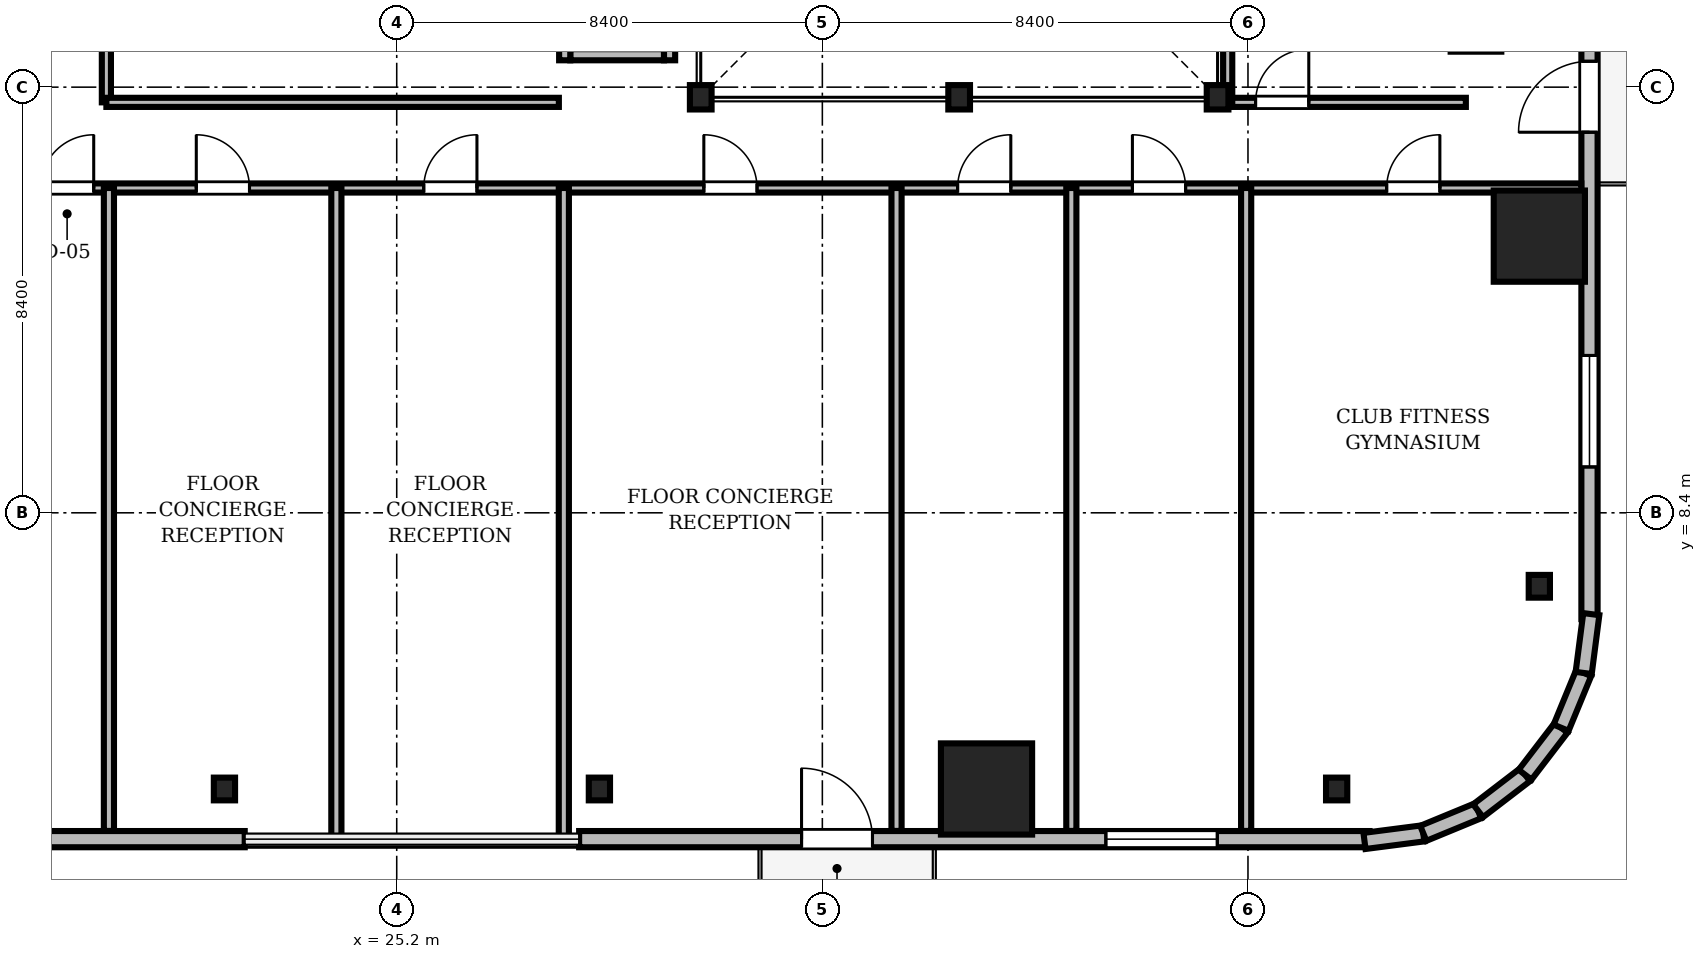
"""IFC4 building model, lengths in metres.
Left out: names, types, materials, properties, quantities, classifications, styles, units other than length and angle.
Written with IfcOpenShell. Run it as: python <this file> out.ifc"""

import sys

from ifc_helpers import new_model, si_unit, direction, frame, frame_2d, origin, origin_2d, place, context, subcontext, project, spatial, rectangle, i_section, extrude, source, transform, mapped, element, fill, save


model = new_model("IFC4")
c1 = context("Model", 3, precision=1e-05, world=origin(), true_north=direction((0.0, 1.0)))
c2 = subcontext(c1, "Body", "Model", "MODEL_VIEW")
j1 = project(units=[si_unit("LENGTHUNIT", "METRE"), si_unit("PLANEANGLEUNIT", "RADIAN")], contexts=[c1])
p1 = place(None, origin())
s1 = spatial("IfcSite", under=j1, at=p1, CompositionType="ELEMENT")
p2 = place(p1, origin())
s2 = spatial("IfcBuilding", under=s1, at=p2, CompositionType="ELEMENT")
p3 = place(p2, frame((0.0, 0.0, 82.35)))
s3 = spatial("IfcBuildingStorey", under=s2, at=p3, CompositionType="ELEMENT", Elevation=82.35)
m1 = source(origin(), c2, "Body", "SweptSolid", [
    extrude(i_section(OverallWidth=0.428, OverallDepth=0.481, WebThickness=0.04, FlangeThickness=0.063, FilletRadius=0.015, at=origin_2d()), origin(), (0.0, 0.0, 1.0), 3.41),
])
for number, where, z_axis, x_axis in (
    (1, (31.2, 16.6, 0.0), (0.0, 0.0, 1.0), (1.0, 0.0, 0.0)),
    (2, (36.3, 16.6, 0.0), (0.0, 0.0, 1.0), (1.0, 0.0, 0.0)),
    (3, (41.4, 16.6, 0.0), (0.0, 0.0, 1.0), (1.0, 0.0, 0.0)),
):
    element("IfcColumn", number, at=place(p3, frame(where, z_axis=z_axis, x_axis=x_axis)), inside=s3, PredefinedType="COLUMN", context=c2, shape_type="MappedRepresentation", body=[
        mapped(m1, transform((0.0, 0.0, 0.0), scale=1.0)),
    ])
m2 = source(origin(), c2, "Body", "SweptSolid", [
    extrude(rectangle(XDim=1.8, YDim=1.8, at=origin_2d()), origin(), (0.0, 0.0, 1.0), 3.41),
])
for number, where, z_axis, x_axis in (
    (4, (36.84, 2.95, 0.0), (0.0, 0.0, 1.0), (1.0, 0.0, 0.0)),
    (5, (47.75, 13.86, 0.0), (0.0, 0.0, 1.0), (1.0, 0.0, 0.0)),
):
    element("IfcColumn", number, at=place(p3, frame(where, z_axis=z_axis, x_axis=x_axis)), inside=s3, PredefinedType="COLUMN", context=c2, shape_type="MappedRepresentation", body=[
        mapped(m2, transform((0.0, 0.0, 0.0), scale=1.0)),
    ])
m3 = source(origin(), c2, "Body", "SweptSolid", [
    extrude(i_section(OverallWidth=0.419, OverallDepth=0.449, WebThickness=0.031, FlangeThickness=0.048, FilletRadius=0.015, at=origin_2d()), origin(), (0.0, 0.0, 1.0), 3.41),
])
for number, where, z_axis, x_axis in (
    (6, (21.8, 2.95, 0.0), (0.0, 0.0, 1.0), (1.0, 0.0, 0.0)),
    (7, (29.2, 2.95, 0.0), (0.0, 0.0, 1.0), (1.0, 0.0, 0.0)),
    (8, (43.75, 2.95, 0.0), (0.0, 0.0, 1.0), (1.0, 0.0, 0.0)),
    (9, (47.75, 6.95, 0.0), (0.0, 0.0, 1.0), (1.0, 0.0, 0.0)),
):
    element("IfcColumn", number, at=place(p3, frame(where, z_axis=z_axis, x_axis=x_axis)), inside=s3, PredefinedType="COLUMN", context=c2, shape_type="MappedRepresentation", body=[
        mapped(m3, transform((0.0, 0.0, 0.0), scale=1.0)),
    ])
m4 = source(origin(), c2, "Body", "SweptSolid", [
    extrude(rectangle(XDim=15.6, YDim=0.32, at=frame_2d((7.8, 0.0))), origin(), (0.0, 0.0, 1.0), 3.41),
])
p4 = place(p3, frame((6.6, 1.96, 0.0), z_axis=(0.0, 0.0, 1.0), x_axis=(1.0, 0.0, 0.0)))
e10 = element("IfcWall", 10, at=p4, inside=s3, PredefinedType="SOLIDWALL", context=c2, shape_type="MappedRepresentation", body=[
    mapped(m4, transform((0.0, 0.0, 0.0), scale=1.0)),
])
m5 = source(origin(), c2, "Body", "SweptSolid", [
    extrude(rectangle(XDim=2.2, YDim=2.4, at=frame_2d((1.1, 1.2))), frame((0.0, 0.17, 0.0), z_axis=(0.0, -1.0, 0.0), x_axis=(1.0, 0.0, 0.0)), (0.0, 0.0, 1.0), 0.34),
])
p5 = place(p4, frame((3.005, 0.0, 0.72)))
e11 = element("IfcOpeningElement", 11, at=p5, cuts=e10, PredefinedType="OPENING", context=c2, shape_type="MappedRepresentation", body=[
    mapped(m5, transform((0.0, 0.0, 0.0), scale=1.0)),
])
p6 = place(p3, frame((28.8, 1.96, 0.0), z_axis=(0.0, 0.0, 1.0), x_axis=(1.0, 0.0, 0.0)))
e12 = element("IfcWall", 12, at=p6, inside=s3, PredefinedType="SOLIDWALL", context=c2, shape_type="MappedRepresentation", body=[
    mapped(m4, transform((0.0, 0.0, 0.0), scale=1.0)),
])
m6 = source(origin(), c2, "Body", "SweptSolid", [
    extrude(rectangle(XDim=1.4, YDim=2.3, at=frame_2d((0.7, 1.15))), frame((0.0, 0.17, 0.0), z_axis=(0.0, -1.0, 0.0), x_axis=(1.0, 0.0, 0.0)), (0.0, 0.0, 1.0), 0.34),
])
p7 = place(p6, frame((4.39, 0.0, 0.0)))
e13 = element("IfcOpeningElement", 13, at=p7, cuts=e12, PredefinedType="OPENING", context=c2, shape_type="MappedRepresentation", body=[
    mapped(m6, transform((0.0, 0.0, 0.0), scale=1.0)),
])
p8 = place(p6, frame((10.395, 0.0, 0.72)))
e14 = element("IfcOpeningElement", 14, at=p8, cuts=e12, PredefinedType="OPENING", context=c2, shape_type="MappedRepresentation", body=[
    mapped(m5, transform((0.0, 0.0, 0.0), scale=1.0)),
])
p9 = place(p3, frame((48.74, 6.3, 0.0), z_axis=(0.0, 0.0, 1.0), x_axis=(0.0, 1.0, 0.0)))
e15 = element("IfcWall", 15, at=p9, inside=s3, PredefinedType="SOLIDWALL", context=c2, shape_type="MappedRepresentation", body=[
    mapped(m4, transform((0.0, 0.0, 0.0), scale=1.0)),
])
p10 = place(p9, frame((9.61, 0.0, 0.0)))
e16 = element("IfcOpeningElement", 16, at=p10, cuts=e15, PredefinedType="OPENING", context=c2, shape_type="MappedRepresentation", body=[
    mapped(m6, transform((0.0, 0.0, 0.0), scale=1.0)),
])
p11 = place(p9, frame((3.005, 0.0, 0.72)))
e17 = element("IfcOpeningElement", 17, at=p11, cuts=e15, PredefinedType="OPENING", context=c2, shape_type="MappedRepresentation", body=[
    mapped(m5, transform((0.0, 0.0, 0.0), scale=1.0)),
])
m7 = source(origin(), c2, "Body", "SweptSolid", [
    extrude(rectangle(XDim=1.17, YDim=0.32, at=frame_2d((0.585, 0.0))), origin(), (0.0, 0.0, 1.0), 3.41),
])
p12 = place(p3, frame((44.3, 1.925, 0.0), z_axis=(0.0, 0.0, 1.0), x_axis=(0.991762485493, 0.128090485085, 0.0)))
e18 = element("IfcWall", 18, at=p12, inside=s3, PredefinedType="SOLIDWALL", context=c2, shape_type="MappedRepresentation", body=[
    mapped(m7, transform((0.0, 0.0, 0.0), scale=1.0)),
])
m8 = source(origin(), c2, "Body", "SweptSolid", [
    extrude(rectangle(XDim=1.169, YDim=0.32, at=frame_2d((0.585, 0.0))), origin(), (0.0, 0.0, 1.0), 3.41),
])
p13 = place(p3, frame((45.46, 2.074, 0.0), z_axis=(0.0, 0.0, 1.0), x_axis=(0.924479075121, 0.381232789334, 0.0)))
e19 = element("IfcWall", 19, at=p13, inside=s3, PredefinedType="SOLIDWALL", context=c2, shape_type="MappedRepresentation", body=[
    mapped(m8, transform((0.0, 0.0, 0.0), scale=1.0)),
])
m9 = source(origin(), c2, "Body", "SweptSolid", [
    extrude(rectangle(XDim=1.169, YDim=0.32, at=frame_2d((0.584, 0.0))), origin(), (0.0, 0.0, 1.0), 3.41),
])
p14 = place(p3, frame((46.541, 2.52, 0.0), z_axis=(0.0, 0.0, 1.0), x_axis=(0.793663520347, 0.608356981114, 0.0)))
e20 = element("IfcWall", 20, at=p14, inside=s3, PredefinedType="SOLIDWALL", context=c2, shape_type="MappedRepresentation", body=[
    mapped(m9, transform((0.0, 0.0, 0.0), scale=1.0)),
])
m10 = source(origin(), c2, "Body", "SweptSolid", [
    extrude(rectangle(XDim=1.169, YDim=0.32, at=frame_2d((0.584, 0.0))), origin(), (0.0, 0.0, 1.0), 3.41),
])
for number, where, z_axis, x_axis in (
    (21, (47.469, 3.231, 0.0), (0.0, 0.0, 1.0), (0.608, 0.794, 0.0)),
    (22, (48.18, 4.159, 0.0), (0.0, 0.0, 1.0), (0.381, 0.925, 0.0)),
):
    element("IfcWall", number, at=place(p3, frame(where, z_axis=z_axis, x_axis=x_axis)), inside=s3, PredefinedType="SOLIDWALL", context=c2, shape_type="MappedRepresentation", body=[
        mapped(m10, transform((0.0, 0.0, 0.0), scale=1.0)),
    ])
m11 = source(origin(), c2, "Body", "SweptSolid", [
    extrude(rectangle(XDim=1.171, YDim=0.32, at=frame_2d((0.585, 0.0))), origin(), (0.0, 0.0, 1.0), 3.41),
])
p15 = place(p3, frame((48.625, 5.24, 0.0), z_axis=(0.0, 0.0, 1.0), x_axis=(0.128269133229, 0.991739395941, 0.0)))
e23 = element("IfcWall", 23, at=p15, inside=s3, PredefinedType="SOLIDWALL", context=c2, shape_type="MappedRepresentation", body=[
    mapped(m11, transform((0.0, 0.0, 0.0), scale=1.0)),
])
m12 = source(origin(), c2, "Body", "SweptSolid", [
    extrude(rectangle(XDim=1.85, YDim=0.22, at=frame_2d((0.925, 0.0))), origin(), (0.0, 0.0, 1.0), 3.41),
])
p16 = place(p3, frame((28.625, 17.44, 0.0), z_axis=(0.0, 0.0, 1.0), x_axis=(1.0, 0.0, 0.0)))
e24 = element("IfcWall", 24, at=p16, inside=s3, PredefinedType="SOLIDWALL", context=c2, shape_type="MappedRepresentation", body=[
    mapped(m12, transform((0.0, 0.0, 0.0), scale=1.0)),
])
m13 = source(origin(), c2, "Body", "SweptSolid", [
    extrude(rectangle(XDim=2.54, YDim=0.22, at=frame_2d((1.27, 0.0))), origin(), (0.0, 0.0, 1.0), 3.41),
])
for number, where, z_axis, x_axis in (
    (25, (28.515, 17.33, 0.0), (0.0, 0.0, 1.0), (0.0, 1.0, 0.0)),
    (26, (30.585, 17.33, 0.0), (0.0, 0.0, 1.0), (0.0, 1.0, 0.0)),
):
    element("IfcWall", number, at=place(p3, frame(where, z_axis=z_axis, x_axis=x_axis)), inside=s3, PredefinedType="SOLIDWALL", context=c2, shape_type="MappedRepresentation", body=[
        mapped(m13, transform((0.0, 0.0, 0.0), scale=1.0)),
    ])
m14 = source(origin(), c2, "Body", "SweptSolid", [
    extrude(rectangle(XDim=46.156, YDim=0.18, at=frame_2d((23.078, 0.0))), origin(), (0.0, 0.0, 1.0), 2.652),
])
p17 = place(p3, frame((2.422, 14.81, 0.0), z_axis=(0.0, 0.0, 1.0), x_axis=(1.0, 0.0, 0.0)))
e27 = element("IfcWall", 27, at=p17, inside=s3, PredefinedType="PARTITIONING", context=c2, shape_type="MappedRepresentation", body=[
    mapped(m14, transform((0.0, 0.0, 0.0), scale=1.0)),
])
m15 = source(origin(), c2, "Body", "SweptSolid", [
    extrude(rectangle(XDim=1.05, YDim=2.2, at=frame_2d((0.525, 1.1))), frame((0.0, 0.1, 0.0), z_axis=(0.0, -1.0, 0.0), x_axis=(1.0, 0.0, 0.0)), (0.0, 0.0, 1.0), 0.2),
])
p18 = place(p17, frame((15.748, 0.0, 0.0)))
e28 = element("IfcOpeningElement", 28, at=p18, cuts=e27, PredefinedType="OPENING", context=c2, shape_type="MappedRepresentation", body=[
    mapped(m15, transform((0.0, 0.0, 0.0), scale=1.0)),
])
p19 = place(p17, frame((18.823, 0.0, 0.0)))
e29 = element("IfcOpeningElement", 29, at=p19, cuts=e27, PredefinedType="OPENING", context=c2, shape_type="MappedRepresentation", body=[
    mapped(m15, transform((0.0, 0.0, 0.0), scale=1.0)),
])
p20 = place(p17, frame((23.311, 0.0, 0.0)))
e30 = element("IfcOpeningElement", 30, at=p20, cuts=e27, PredefinedType="OPENING", context=c2, shape_type="MappedRepresentation", body=[
    mapped(m15, transform((0.0, 0.0, 0.0), scale=1.0)),
])
p21 = place(p17, frame((28.839, 0.0, 0.0)))
e31 = element("IfcOpeningElement", 31, at=p21, cuts=e27, PredefinedType="OPENING", context=c2, shape_type="MappedRepresentation", body=[
    mapped(m15, transform((0.0, 0.0, 0.0), scale=1.0)),
])
p22 = place(p17, frame((33.847, 0.0, 0.0)))
e32 = element("IfcOpeningElement", 32, at=p22, cuts=e27, PredefinedType="OPENING", context=c2, shape_type="MappedRepresentation", body=[
    mapped(m15, transform((0.0, 0.0, 0.0), scale=1.0)),
])
p23 = place(p17, frame((37.297, 0.0, 0.0)))
e33 = element("IfcOpeningElement", 33, at=p23, cuts=e27, PredefinedType="OPENING", context=c2, shape_type="MappedRepresentation", body=[
    mapped(m15, transform((0.0, 0.0, 0.0), scale=1.0)),
])
p24 = place(p17, frame((42.315, 0.0, 0.0)))
e34 = element("IfcOpeningElement", 34, at=p24, cuts=e27, PredefinedType="OPENING", context=c2, shape_type="MappedRepresentation", body=[
    mapped(m15, transform((0.0, 0.0, 0.0), scale=1.0)),
])
m16 = source(origin(), c2, "Body", "SweptSolid", [
    extrude(rectangle(XDim=11.94, YDim=0.18, at=frame_2d((5.97, 0.0))), origin(), (0.0, 0.0, 1.0), 2.802),
])
p25 = place(p3, frame((19.47, 16.5, 0.0), z_axis=(0.0, 0.0, 1.0), x_axis=(0.0, 1.0, 0.0)))
e35 = element("IfcWall", 35, at=p25, inside=s3, PredefinedType="PARTITIONING", context=c2, shape_type="MappedRepresentation", body=[
    mapped(m16, transform((0.0, 0.0, 0.0), scale=1.0)),
])
p26 = place(p25, frame((4.5, 0.0, 0.0)))
e36 = element("IfcOpeningElement", 36, at=p26, cuts=e35, PredefinedType="OPENING", context=c2, shape_type="MappedRepresentation", body=[
    mapped(m15, transform((0.0, 0.0, 0.0), scale=1.0)),
])
m17 = source(origin(), c2, "Body", "SweptSolid", [
    extrude(rectangle(XDim=4.7, YDim=0.18, at=frame_2d((2.35, 0.0))), origin(), (0.0, 0.0, 1.0), 2.802),
])
p27 = place(p3, frame((41.6, 16.5, 0.0), z_axis=(0.0, 0.0, 1.0), x_axis=(1.0, 0.0, 0.0)))
e37 = element("IfcWall", 37, at=p27, inside=s3, PredefinedType="PARTITIONING", context=c2, shape_type="MappedRepresentation", body=[
    mapped(m17, transform((0.0, 0.0, 0.0), scale=1.0)),
])
p28 = place(p27, frame((0.55, 0.0, 0.0)))
e38 = element("IfcOpeningElement", 38, at=p28, cuts=e37, PredefinedType="OPENING", context=c2, shape_type="MappedRepresentation", body=[
    mapped(m15, transform((0.0, 0.0, 0.0), scale=1.0)),
])
m18 = source(origin(), c2, "Body", "SweptSolid", [
    extrude(rectangle(XDim=12.688, YDim=0.2, at=frame_2d((6.344, 0.0))), origin(), (0.0, 0.0, 1.0), 2.652),
])
p29 = place(p3, frame((19.52, 2.122, 0.0), z_axis=(0.0, 0.0, 1.0), x_axis=(0.0, 1.0, 0.0)))
e39 = element("IfcWall", 39, at=p29, inside=s3, PredefinedType="PARTITIONING", context=c2, shape_type="MappedRepresentation", body=[
    mapped(m18, transform((0.0, 0.0, 0.0), scale=1.0)),
])
m19 = source(origin(), c2, "Body", "SweptSolid", [
    extrude(rectangle(XDim=12.88, YDim=0.2, at=frame_2d((6.44, 0.0))), origin(), (0.0, 0.0, 1.0), 2.652),
])
for number, where, z_axis, x_axis in (
    (40, (24.009, 1.93, 0.0), (0.0, 0.0, 1.0), (0.0, 1.0, 0.0)),
    (41, (28.498, 1.93, 0.0), (0.0, 0.0, 1.0), (0.0, 1.0, 0.0)),
):
    element("IfcWall", number, at=place(p3, frame(where, z_axis=z_axis, x_axis=x_axis)), inside=s3, PredefinedType="PARTITIONING", context=c2, shape_type="MappedRepresentation", body=[
        mapped(m19, transform((0.0, 0.0, 0.0), scale=1.0)),
    ])
for number, where, z_axis, x_axis in (
    (42, (35.064, 2.122, 0.0), (0.0, 0.0, 1.0), (0.0, 1.0, 0.0)),
    (43, (38.514, 2.122, 0.0), (0.0, 0.0, 1.0), (0.0, 1.0, 0.0)),
    (44, (41.964, 2.122, 0.0), (0.0, 0.0, 1.0), (0.0, 1.0, 0.0)),
):
    element("IfcWall", number, at=place(p3, frame(where, z_axis=z_axis, x_axis=x_axis)), inside=s3, PredefinedType="PARTITIONING", context=c2, shape_type="MappedRepresentation", body=[
        mapped(m18, transform((0.0, 0.0, 0.0), scale=1.0)),
    ])
m20 = source(origin(), c2, "Body", "SweptSolid", [
    extrude(rectangle(XDim=8.93, YDim=0.18, at=frame_2d((4.465, 0.0))), origin(), (0.0, 0.0, 1.0), 2.802),
])
p30 = place(p3, frame((19.47, 16.5, 0.0), z_axis=(0.0, 0.0, 1.0), x_axis=(1.0, 0.0, 0.0)))
e45 = element("IfcWall", 45, at=p30, inside=s3, PredefinedType="PARTITIONING", context=c2, shape_type="MappedRepresentation", body=[
    mapped(m20, transform((0.0, 0.0, 0.0), scale=1.0)),
])
m21 = source(origin(), c2, "Body", "SweptSolid", [
    extrude(rectangle(XDim=7.15, YDim=0.18, at=frame_2d((3.575, 0.0))), origin(), (0.0, 0.0, 1.0), 2.802),
])
p31 = place(p3, frame((41.6, 16.5, 0.0), z_axis=(0.0, 0.0, 1.0), x_axis=(0.0, 1.0, 0.0)))
e46 = element("IfcWall", 46, at=p31, inside=s3, PredefinedType="PARTITIONING", context=c2, shape_type="MappedRepresentation", body=[
    mapped(m21, transform((0.0, 0.0, 0.0), scale=1.0)),
])
m22 = source(origin(), c2, "Body", "SweptSolid", [
    extrude(rectangle(XDim=1.4, YDim=2.3, at=frame_2d((0.7, 1.15))), frame((0.0, 0.025, 0.0), z_axis=(0.0, -1.0, 0.0), x_axis=(1.0, 0.0, 0.0)), (0.0, 0.0, 1.0), 0.05),
])
p32 = place(p7, frame((1.4, 0.0, 0.0), z_axis=(0.0, 0.0, 1.0), x_axis=(-1.0, 0.0, 0.0)))
e47 = element("IfcDoor", 47, at=p32, inside=s3, OperationType="DOUBLE_DOOR_SLIDING", PredefinedType="DOOR", context=c2, shape_type="MappedRepresentation", body=[
    mapped(m22, transform((0.0, 0.0, 0.0), scale=1.0)),
])
fill(e13, e47)
m23 = source(origin(), c2, "Body", "SweptSolid", [
    extrude(rectangle(XDim=2.2, YDim=2.4, at=frame_2d((1.1, 1.2))), frame((0.0, 0.03, 0.0), z_axis=(0.0, -1.0, 0.0), x_axis=(1.0, 0.0, 0.0)), (0.0, 0.0, 1.0), 0.06),
])
p33 = place(p8, origin())
e48 = element("IfcWindow", 48, at=p33, inside=s3, PartitioningType="SINGLE_PANEL", PredefinedType="WINDOW", context=c2, shape_type="MappedRepresentation", body=[
    mapped(m23, transform((0.0, 0.0, 0.0), scale=1.0)),
])
fill(e14, e48)
p34 = place(p10, frame((1.4, 0.0, 0.0), z_axis=(0.0, 0.0, 1.0), x_axis=(-1.0, 0.0, 0.0)))
e49 = element("IfcDoor", 49, at=p34, inside=s3, OperationType="DOUBLE_DOOR_SLIDING", PredefinedType="DOOR", context=c2, shape_type="MappedRepresentation", body=[
    mapped(m22, transform((0.0, 0.0, 0.0), scale=1.0)),
])
fill(e16, e49)
p35 = place(p11, origin())
e50 = element("IfcWindow", 50, at=p35, inside=s3, PartitioningType="SINGLE_PANEL", PredefinedType="WINDOW", context=c2, shape_type="MappedRepresentation", body=[
    mapped(m23, transform((0.0, 0.0, 0.0), scale=1.0)),
])
fill(e17, e50)
m24 = source(origin(), c2, "Body", "SweptSolid", [
    extrude(rectangle(XDim=1.05, YDim=2.2, at=frame_2d((0.525, 1.1))), frame((0.0, 0.025, 0.0), z_axis=(0.0, -1.0, 0.0), x_axis=(1.0, 0.0, 0.0)), (0.0, 0.0, 1.0), 0.05),
])
p36 = place(p18, origin())
e51 = element("IfcDoor", 51, at=p36, inside=s3, OperationType="SINGLE_SWING_RIGHT", PredefinedType="DOOR", context=c2, shape_type="MappedRepresentation", body=[
    mapped(m24, transform((0.0, 0.0, 0.0), scale=1.0)),
])
fill(e28, e51)
p37 = place(p19, origin())
e52 = element("IfcDoor", 52, at=p37, inside=s3, OperationType="SINGLE_SWING_LEFT", PredefinedType="DOOR", context=c2, shape_type="MappedRepresentation", body=[
    mapped(m24, transform((0.0, 0.0, 0.0), scale=1.0)),
])
fill(e29, e52)
p38 = place(p20, origin())
e53 = element("IfcDoor", 53, at=p38, inside=s3, OperationType="SINGLE_SWING_RIGHT", PredefinedType="DOOR", context=c2, shape_type="MappedRepresentation", body=[
    mapped(m24, transform((0.0, 0.0, 0.0), scale=1.0)),
])
fill(e30, e53)
p39 = place(p21, origin())
e54 = element("IfcDoor", 54, at=p39, inside=s3, OperationType="SINGLE_SWING_LEFT", PredefinedType="DOOR", context=c2, shape_type="MappedRepresentation", body=[
    mapped(m24, transform((0.0, 0.0, 0.0), scale=1.0)),
])
fill(e31, e54)
p40 = place(p22, origin())
e55 = element("IfcDoor", 55, at=p40, inside=s3, OperationType="SINGLE_SWING_RIGHT", PredefinedType="DOOR", context=c2, shape_type="MappedRepresentation", body=[
    mapped(m24, transform((0.0, 0.0, 0.0), scale=1.0)),
])
fill(e32, e55)
p41 = place(p23, origin())
e56 = element("IfcDoor", 56, at=p41, inside=s3, OperationType="SINGLE_SWING_LEFT", PredefinedType="DOOR", context=c2, shape_type="MappedRepresentation", body=[
    mapped(m24, transform((0.0, 0.0, 0.0), scale=1.0)),
])
fill(e33, e56)
p42 = place(p24, origin())
e57 = element("IfcDoor", 57, at=p42, inside=s3, OperationType="SINGLE_SWING_RIGHT", PredefinedType="DOOR", context=c2, shape_type="MappedRepresentation", body=[
    mapped(m24, transform((0.0, 0.0, 0.0), scale=1.0)),
])
fill(e34, e57)
p43 = place(p28, origin())
e58 = element("IfcDoor", 58, at=p43, inside=s3, OperationType="SINGLE_SWING_RIGHT", PredefinedType="DOOR", context=c2, shape_type="MappedRepresentation", body=[
    mapped(m24, transform((0.0, 0.0, 0.0), scale=1.0)),
])
fill(e38, e58)
save(model, sys.argv[1])
